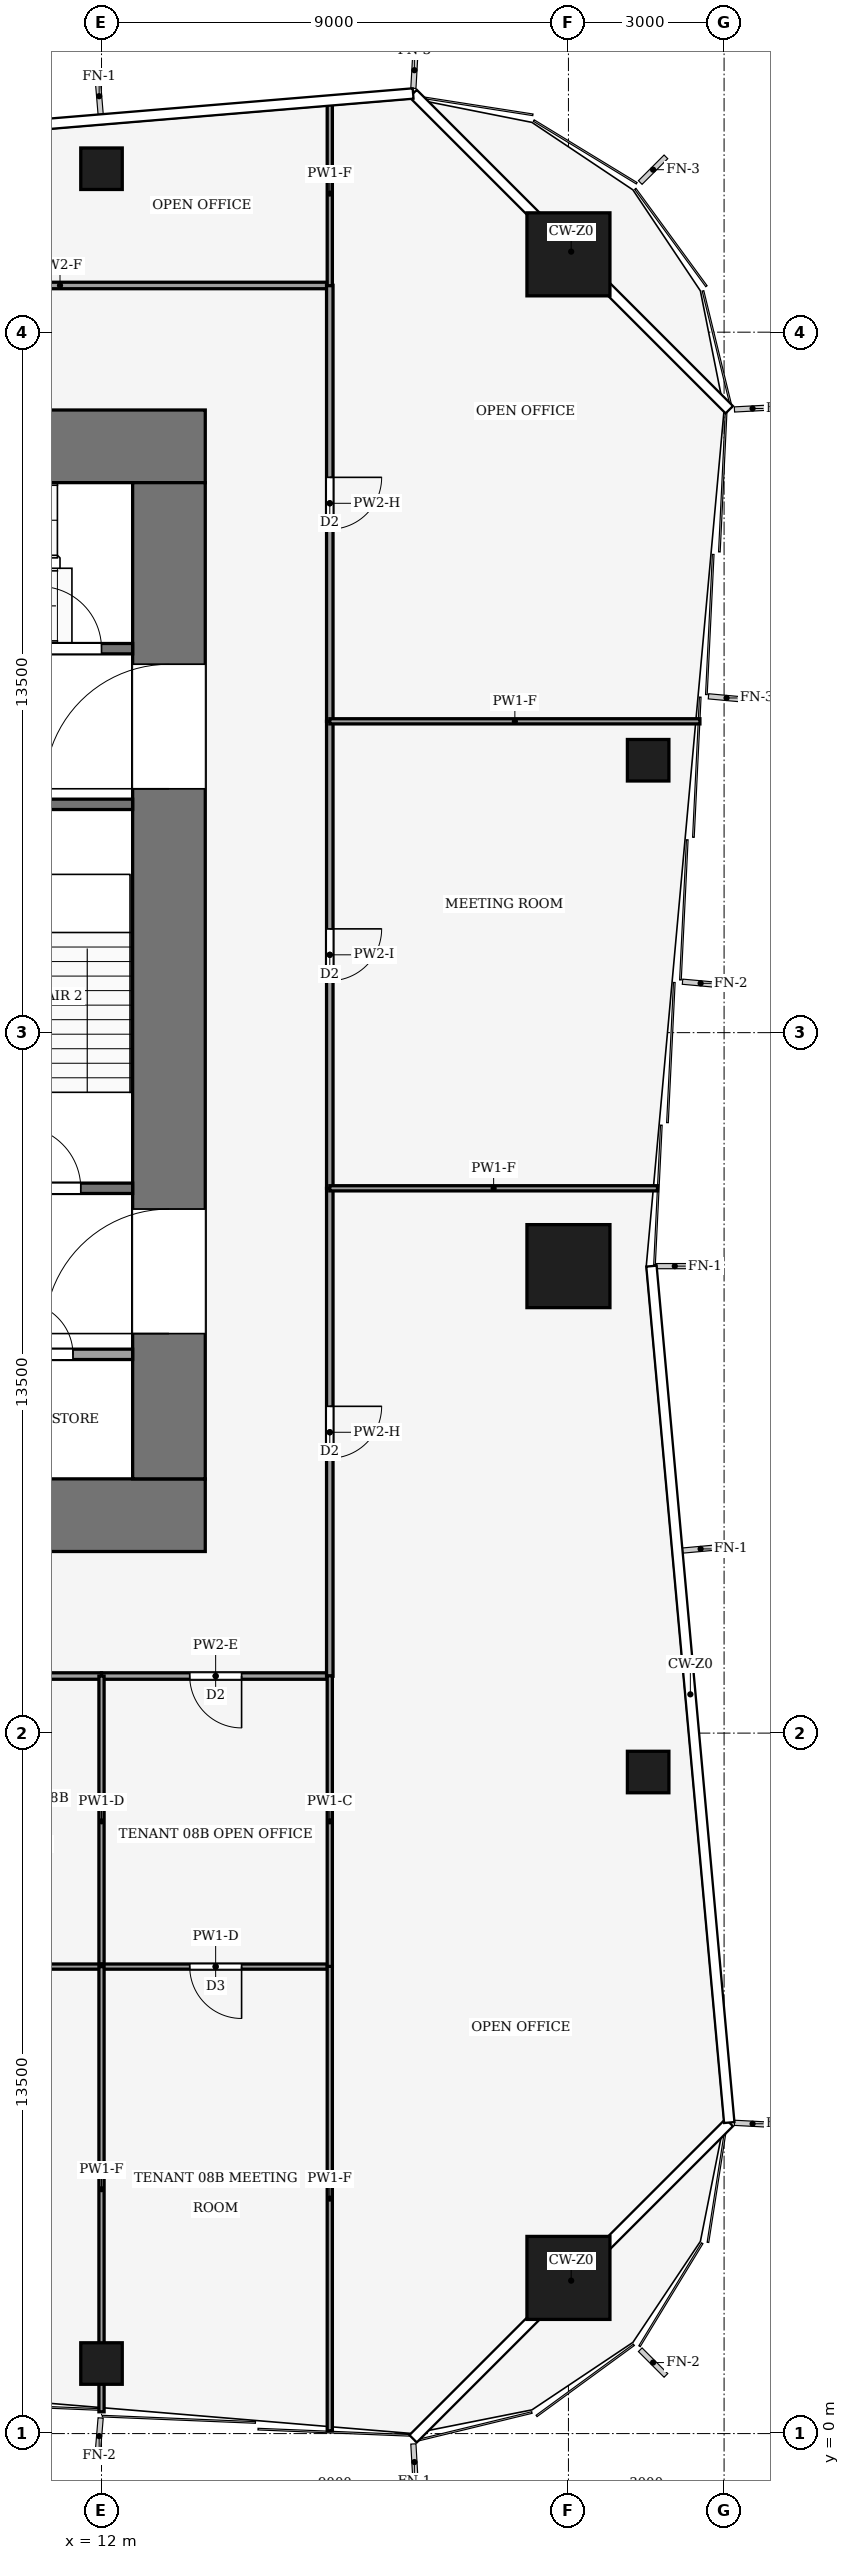
"""IFC4 building model, lengths in metres.
Left out: names, types, materials, properties, quantities, classifications, styles, units other than length and angle.
Written with IfcOpenShell. Run it as: python <this file> out.ifc"""

import sys

from ifc_helpers import new_model, si_unit, direction, frame, frame_2d, origin, origin_2d, place, context, subcontext, project, spatial, rectangle, hollow_rectangle, extrude, element, fill, save


model = new_model("IFC4")
c1 = context("Model", 3, precision=1e-05, world=origin(), true_north=direction((0.0, 1.0)))
c2 = subcontext(c1, "Body", "Model", "MODEL_VIEW")
j1 = project(units=[si_unit("LENGTHUNIT", "METRE"), si_unit("PLANEANGLEUNIT", "RADIAN")], contexts=[c1])
p1 = place(None, origin())
s1 = spatial("IfcSite", under=j1, at=p1, CompositionType="ELEMENT")
p2 = place(p1, origin())
s2 = spatial("IfcBuilding", under=s1, at=p2, CompositionType="ELEMENT")
p3 = place(p2, frame((0.0, 0.0, 38.0)))
s3 = spatial("IfcBuildingStorey", under=s2, at=p3, CompositionType="ELEMENT", Elevation=38.0)
for number, where, z_axis, x_axis in (
    (1, (-14.0, 17.7, -0.13), (0.0, 0.0, 1.0), (1.0, 0.0, 0.0)),
    (2, (-14.0, 38.3, -0.13), (0.0, 0.0, 1.0), (1.0, 0.0, 0.0)),
):
    element("IfcWall", number, at=place(p3, frame(where, z_axis=z_axis, x_axis=x_axis)), inside=s3, PredefinedType="SHEAR", context=c2, shape_type="SweptSolid", body=[
        extrude(rectangle(XDim=28.0, YDim=1.4, at=frame_2d((14.0, 0.0))), origin(), (0.0, 0.0, 1.0), 4.0),
    ])
p4 = place(p3, frame((13.3, 18.4, -0.13), z_axis=(0.0, 0.0, 1.0), x_axis=(0.0, 1.0, 0.0)))
e3 = element("IfcWall", 3, at=p4, inside=s3, PredefinedType="SHEAR", context=c2, shape_type="SweptSolid", body=[
    extrude(rectangle(XDim=19.2, YDim=1.4, at=frame_2d((9.6, 0.0))), origin(), (0.0, 0.0, 1.0), 4.0),
])
p5 = place(p4, frame((2.8, 0.0, 0.13)))
e4 = element("IfcOpeningElement", 4, at=p5, cuts=e3, PredefinedType="OPENING", context=c2, shape_type="SweptSolid", body=[
    extrude(rectangle(XDim=2.4, YDim=2.4, at=frame_2d((1.2, 1.2))), frame((0.0, 0.71, 0.0), z_axis=(0.0, -1.0, 0.0), x_axis=(1.0, 0.0, 0.0)), (0.0, 0.0, 1.0), 1.42),
])
p6 = place(p4, frame((13.3, 0.0, 0.13)))
e5 = element("IfcOpeningElement", 5, at=p6, cuts=e3, PredefinedType="OPENING", context=c2, shape_type="SweptSolid", body=[
    extrude(rectangle(XDim=2.4, YDim=2.4, at=frame_2d((1.2, 1.2))), frame((0.0, 0.71, 0.0), z_axis=(0.0, -1.0, 0.0), x_axis=(1.0, 0.0, 0.0)), (0.0, 0.0, 1.0), 1.42),
])
for number, where, z_axis, x_axis in (
    (6, (21.0, 42.0, 0.0), (0.0, 0.0, 1.0), (1.0, 0.0, 0.0)),
    (7, (21.0, 22.5, 0.0), (0.0, 0.0, 1.0), (1.0, 0.0, 0.0)),
    (8, (21.0, 3.0, 0.0), (0.0, 0.0, 1.0), (1.0, 0.0, 0.0)),
):
    element("IfcColumn", number, at=place(p3, frame(where, z_axis=z_axis, x_axis=x_axis)), inside=s3, PredefinedType="COLUMN", context=c2, shape_type="SweptSolid", body=[
        extrude(hollow_rectangle(XDim=1.6, YDim=1.6, WallThickness=0.09, at=origin_2d()), origin(), (0.0, 0.0, 1.0), 4.0),
    ])
for number, where, z_axis, x_axis in (
    (9, (12.0, 43.65, 0.0), (0.0, 0.0, 1.0), (1.0, 0.0, 0.0)),
    (10, (12.0, 1.35, 0.0), (0.0, 0.0, 1.0), (1.0, 0.0, 0.0)),
    (11, (22.536, 12.75, 0.0), (0.0, 0.0, 1.0), (1.0, 0.0, 0.0)),
    (12, (22.536, 32.25, 0.0), (0.0, 0.0, 1.0), (1.0, 0.0, 0.0)),
):
    element("IfcColumn", number, at=place(p3, frame(where, z_axis=z_axis, x_axis=x_axis)), inside=s3, PredefinedType="COLUMN", context=c2, shape_type="SweptSolid", body=[
        extrude(hollow_rectangle(XDim=0.8, YDim=0.8, WallThickness=0.04, at=origin_2d()), origin(), (0.0, 0.0, 1.0), 4.0),
    ])
p7 = place(p3, frame((6.0, 20.8, 0.0), z_axis=(0.0, 0.0, 1.0), x_axis=(1.0, 0.0, 0.0)))
e13 = element("IfcWall", 13, at=p7, inside=s3, PredefinedType="PARTITIONING", context=c2, shape_type="SweptSolid", body=[
    extrude(rectangle(XDim=6.6, YDim=0.2, at=frame_2d((3.3, 0.0))), origin(), (0.0, 0.0, 1.0), 3.87),
])
p8 = place(p7, frame((1.15, 0.0, 0.0)))
e14 = element("IfcOpeningElement", 14, at=p8, cuts=e13, PredefinedType="OPENING", context=c2, shape_type="SweptSolid", body=[
    extrude(rectangle(XDim=1.0, YDim=2.1, at=frame_2d((0.5, 1.05))), frame((0.0, 0.11, 0.0), z_axis=(0.0, -1.0, 0.0), x_axis=(1.0, 0.0, 0.0)), (0.0, 0.0, 1.0), 0.22),
])
p9 = place(p7, frame((4.45, 0.0, 0.0)))
e15 = element("IfcOpeningElement", 15, at=p9, cuts=e13, PredefinedType="OPENING", context=c2, shape_type="SweptSolid", body=[
    extrude(rectangle(XDim=1.0, YDim=2.1, at=frame_2d((0.5, 1.05))), frame((0.0, 0.11, 0.0), z_axis=(0.0, -1.0, 0.0), x_axis=(1.0, 0.0, 0.0)), (0.0, 0.0, 1.0), 0.22),
])
p10 = place(p3, frame((6.0, 24.0, 0.0), z_axis=(0.0, 0.0, 1.0), x_axis=(1.0, 0.0, 0.0)))
e16 = element("IfcWall", 16, at=p10, inside=s3, PredefinedType="PARTITIONING", context=c2, shape_type="SweptSolid", body=[
    extrude(rectangle(XDim=6.6, YDim=0.2, at=frame_2d((3.3, 0.0))), origin(), (0.0, 0.0, 1.0), 3.87),
])
p11 = place(p10, frame((0.9, 0.0, 0.0)))
e17 = element("IfcOpeningElement", 17, at=p11, cuts=e16, PredefinedType="OPENING", context=c2, shape_type="SweptSolid", body=[
    extrude(rectangle(XDim=1.0, YDim=2.1, at=frame_2d((0.5, 1.05))), frame((0.0, 0.11, 0.0), z_axis=(0.0, -1.0, 0.0), x_axis=(1.0, 0.0, 0.0)), (0.0, 0.0, 1.0), 0.22),
])
p12 = place(p10, frame((4.4, 0.0, 0.0)))
e18 = element("IfcOpeningElement", 18, at=p12, cuts=e16, PredefinedType="OPENING", context=c2, shape_type="SweptSolid", body=[
    extrude(rectangle(XDim=1.2, YDim=2.2, at=frame_2d((0.6, 1.1))), frame((0.0, 0.11, 0.0), z_axis=(0.0, -1.0, 0.0), x_axis=(1.0, 0.0, 0.0)), (0.0, 0.0, 1.0), 0.22),
])
p13 = place(p3, frame((6.0, 31.4, 0.0), z_axis=(0.0, 0.0, 1.0), x_axis=(1.0, 0.0, 0.0)))
e19 = element("IfcWall", 19, at=p13, inside=s3, PredefinedType="PARTITIONING", context=c2, shape_type="SweptSolid", body=[
    extrude(rectangle(XDim=6.6, YDim=0.2, at=frame_2d((3.3, 0.0))), origin(), (0.0, 0.0, 1.0), 3.87),
])
p14 = place(p3, frame((6.0, 34.4, 0.0), z_axis=(0.0, 0.0, 1.0), x_axis=(1.0, 0.0, 0.0)))
e20 = element("IfcWall", 20, at=p14, inside=s3, PredefinedType="PARTITIONING", context=c2, shape_type="SweptSolid", body=[
    extrude(rectangle(XDim=6.6, YDim=0.2, at=frame_2d((3.3, 0.0))), origin(), (0.0, 0.0, 1.0), 3.87),
])
p15 = place(p14, frame((4.8, 0.0, 0.0)))
e21 = element("IfcOpeningElement", 21, at=p15, cuts=e20, PredefinedType="OPENING", context=c2, shape_type="SweptSolid", body=[
    extrude(rectangle(XDim=1.2, YDim=2.2, at=frame_2d((0.6, 1.1))), frame((0.0, 0.11, 0.0), z_axis=(0.0, -1.0, 0.0), x_axis=(1.0, 0.0, 0.0)), (0.0, 0.0, 1.0), 0.22),
])
p16 = place(p3, frame((9.0, 14.6, 0.0), z_axis=(0.0, 0.0, 1.0), x_axis=(1.0, 0.0, 0.0)))
e22 = element("IfcWall", 22, at=p16, inside=s3, PredefinedType="PARTITIONING", context=c2, shape_type="SweptSolid", body=[
    extrude(rectangle(XDim=3.0, YDim=0.125, at=frame_2d((1.5, 0.0))), origin(), (0.0, 0.0, 1.0), 3.29),
])
p17 = place(p3, frame((16.4, 14.6, 0.0), z_axis=(0.0, 0.0, 1.0), x_axis=(-1.0, 0.0, 0.0)))
e23 = element("IfcWall", 23, at=p17, inside=s3, PredefinedType="PARTITIONING", context=c2, shape_type="SweptSolid", body=[
    extrude(rectangle(XDim=4.4, YDim=0.125, at=frame_2d((2.2, 0.0))), origin(), (0.0, 0.0, 1.0), 3.29),
])
p18 = place(p17, frame((1.7, 0.0, 0.0)))
e24 = element("IfcOpeningElement", 24, at=p18, cuts=e23, PredefinedType="OPENING", context=c2, shape_type="SweptSolid", body=[
    extrude(rectangle(XDim=1.0, YDim=2.1, at=frame_2d((0.5, 1.05))), frame((0.0, 0.073, 0.0), z_axis=(0.0, -1.0, 0.0), x_axis=(1.0, 0.0, 0.0)), (0.0, 0.0, 1.0), 0.145),
])
p19 = place(p3, frame((6.0, 41.4, 0.0), z_axis=(0.0, 0.0, 1.0), x_axis=(1.0, 0.0, 0.0)))
e25 = element("IfcWall", 25, at=p19, inside=s3, PredefinedType="PARTITIONING", context=c2, shape_type="SweptSolid", body=[
    extrude(rectangle(XDim=10.4, YDim=0.125, at=frame_2d((5.2, 0.0))), origin(), (0.0, 0.0, 1.0), 3.54),
])
p20 = place(p19, frame((1.9, 0.0, 0.0)))
e26 = element("IfcOpeningElement", 26, at=p20, cuts=e25, PredefinedType="OPENING", context=c2, shape_type="SweptSolid", body=[
    extrude(rectangle(XDim=1.0, YDim=2.1, at=frame_2d((0.5, 1.05))), frame((0.0, 0.073, 0.0), z_axis=(0.0, -1.0, 0.0), x_axis=(1.0, 0.0, 0.0)), (0.0, 0.0, 1.0), 0.145),
])
p21 = place(p3, frame((16.4, 24.0, 0.0), z_axis=(0.0, 0.0, 1.0), x_axis=(0.0, -1.0, 0.0)))
e27 = element("IfcWall", 27, at=p21, inside=s3, PredefinedType="PARTITIONING", context=c2, shape_type="SweptSolid", body=[
    extrude(rectangle(XDim=9.404, YDim=0.125, at=frame_2d((4.702, 0.0))), origin(), (0.0, 0.0, 1.0), 3.14),
])
p22 = place(p21, frame((4.202, 0.0, 0.0)))
e28 = element("IfcOpeningElement", 28, at=p22, cuts=e27, PredefinedType="OPENING", context=c2, shape_type="SweptSolid", body=[
    extrude(rectangle(XDim=1.0, YDim=2.1, at=frame_2d((0.5, 1.05))), frame((0.0, 0.073, 0.0), z_axis=(0.0, -1.0, 0.0), x_axis=(1.0, 0.0, 0.0)), (0.0, 0.0, 1.0), 0.145),
])
p23 = place(p3, frame((16.4, 33.0, 0.0), z_axis=(0.0, 0.0, 1.0), x_axis=(0.0, -1.0, 0.0)))
e29 = element("IfcWall", 29, at=p23, inside=s3, PredefinedType="PARTITIONING", context=c2, shape_type="SweptSolid", body=[
    extrude(rectangle(XDim=9.0, YDim=0.125, at=frame_2d((4.5, 0.0))), origin(), (0.0, 0.0, 1.0), 3.48),
])
p24 = place(p23, frame((4.0, 0.0, 0.0)))
e30 = element("IfcOpeningElement", 30, at=p24, cuts=e29, PredefinedType="OPENING", context=c2, shape_type="SweptSolid", body=[
    extrude(rectangle(XDim=1.0, YDim=2.1, at=frame_2d((0.5, 1.05))), frame((0.0, 0.073, 0.0), z_axis=(0.0, -1.0, 0.0), x_axis=(1.0, 0.0, 0.0)), (0.0, 0.0, 1.0), 0.145),
])
p25 = place(p3, frame((16.4, 41.404, 0.0), z_axis=(0.0, 0.0, 1.0), x_axis=(0.0, -1.0, 0.0)))
e31 = element("IfcWall", 31, at=p25, inside=s3, PredefinedType="PARTITIONING", context=c2, shape_type="SweptSolid", body=[
    extrude(rectangle(XDim=8.404, YDim=0.125, at=frame_2d((4.202, 0.0))), origin(), (0.0, 0.0, 1.0), 3.14),
])
p26 = place(p25, frame((3.702, 0.0, 0.0)))
e32 = element("IfcOpeningElement", 32, at=p26, cuts=e31, PredefinedType="OPENING", context=c2, shape_type="SweptSolid", body=[
    extrude(rectangle(XDim=1.0, YDim=2.1, at=frame_2d((0.5, 1.05))), frame((0.0, 0.073, 0.0), z_axis=(0.0, -1.0, 0.0), x_axis=(1.0, 0.0, 0.0)), (0.0, 0.0, 1.0), 0.145),
])
p27 = place(p3, frame((12.0, 9.0, 0.0), z_axis=(0.0, 0.0, 1.0), x_axis=(0.0, 1.0, 0.0)))
e33 = element("IfcWall", 33, at=p27, inside=s3, PredefinedType="PARTITIONING", context=c2, shape_type="SweptSolid", body=[
    extrude(rectangle(XDim=5.6, YDim=0.1, at=frame_2d((2.8, 0.0))), origin(), (0.0, 0.0, 1.0), 3.29),
])
p28 = place(p3, frame((8.996, 9.0, 0.0), z_axis=(0.0, 0.0, 1.0), x_axis=(1.0, 0.0, 0.0)))
e34 = element("IfcWall", 34, at=p28, inside=s3, PredefinedType="PARTITIONING", context=c2, shape_type="SweptSolid", body=[
    extrude(rectangle(XDim=3.004, YDim=0.1, at=frame_2d((1.502, 0.0))), origin(), (0.0, 0.0, 1.0), 3.87),
])
p29 = place(p3, frame((16.4, 9.0, 0.0), z_axis=(0.0, 0.0, 1.0), x_axis=(-1.0, 0.0, 0.0)))
e35 = element("IfcWall", 35, at=p29, inside=s3, PredefinedType="PARTITIONING", context=c2, shape_type="SweptSolid", body=[
    extrude(rectangle(XDim=4.4, YDim=0.1, at=frame_2d((2.2, 0.0))), origin(), (0.0, 0.0, 1.0), 3.29),
])
p30 = place(p29, frame((1.7, 0.0, 0.0)))
e36 = element("IfcOpeningElement", 36, at=p30, cuts=e35, PredefinedType="OPENING", context=c2, shape_type="SweptSolid", body=[
    extrude(rectangle(XDim=1.0, YDim=2.1, at=frame_2d((0.5, 1.05))), frame((0.0, 0.06, 0.0), z_axis=(0.0, -1.0, 0.0), x_axis=(1.0, 0.0, 0.0)), (0.0, 0.0, 1.0), 0.12),
])
p31 = place(p3, frame((16.4, 8.996, 0.0), z_axis=(0.0, 0.0, 1.0), x_axis=(0.0, 1.0, 0.0)))
e37 = element("IfcWall", 37, at=p31, inside=s3, PredefinedType="PARTITIONING", context=c2, shape_type="SweptSolid", body=[
    extrude(rectangle(XDim=5.608, YDim=0.1, at=frame_2d((2.804, 0.0))), origin(), (0.0, 0.0, 1.0), 3.87),
])
p32 = place(p3, frame((12.0, 0.42, 0.0), z_axis=(0.0, 0.0, 1.0), x_axis=(0.0, 1.0, 0.0)))
e38 = element("IfcWall", 38, at=p32, inside=s3, PredefinedType="PARTITIONING", context=c2, shape_type="SweptSolid", body=[
    extrude(rectangle(XDim=8.58, YDim=0.1, at=frame_2d((4.29, 0.0))), origin(), (0.0, 0.0, 1.0), 3.04),
])
p33 = place(p3, frame((16.4, 0.053, 0.0), z_axis=(0.0, 0.0, 1.0), x_axis=(0.0, 1.0, 0.0)))
e39 = element("IfcWall", 39, at=p33, inside=s3, PredefinedType="PARTITIONING", context=c2, shape_type="SweptSolid", body=[
    extrude(rectangle(XDim=8.951, YDim=0.1, at=frame_2d((4.475, 0.0))), origin(), (0.0, 0.0, 1.0), 3.04),
])
p34 = place(p3, frame((16.4, 41.396, 0.0), z_axis=(0.0, 0.0, 1.0), x_axis=(0.0, 1.0, 0.0)))
e40 = element("IfcWall", 40, at=p34, inside=s3, PredefinedType="PARTITIONING", context=c2, shape_type="SweptSolid", body=[
    extrude(rectangle(XDim=3.551, YDim=0.1, at=frame_2d((1.775, 0.0))), origin(), (0.0, 0.0, 1.0), 3.04),
])
p35 = place(p3, frame((22.716, 24.0, 0.0), z_axis=(0.0, 0.0, 1.0), x_axis=(-1.0, 0.0, 0.0)))
e41 = element("IfcWall", 41, at=p35, inside=s3, PredefinedType="PARTITIONING", context=c2, shape_type="SweptSolid", body=[
    extrude(rectangle(XDim=6.316, YDim=0.1, at=frame_2d((3.158, 0.0))), origin(), (0.0, 0.0, 1.0), 3.04),
])
p36 = place(p3, frame((23.534, 33.0, 0.0), z_axis=(0.0, 0.0, 1.0), x_axis=(-1.0, 0.0, 0.0)))
e42 = element("IfcWall", 42, at=p36, inside=s3, PredefinedType="PARTITIONING", context=c2, shape_type="SweptSolid", body=[
    extrude(rectangle(XDim=7.135, YDim=0.1, at=frame_2d((3.567, 0.0))), origin(), (0.0, 0.0, 1.0), 3.04),
])
p37 = place(p9, origin())
e43 = element("IfcDoor", 43, at=p37, inside=s3, OperationType="SINGLE_SWING_LEFT", PredefinedType="DOOR", context=c2, shape_type="SweptSolid", body=[
    extrude(rectangle(XDim=1.0, YDim=2.1, at=frame_2d((0.5, 1.05))), frame((0.0, 0.025, 0.0), z_axis=(0.0, -1.0, 0.0), x_axis=(1.0, 0.0, 0.0)), (0.0, 0.0, 1.0), 0.05),
])
fill(e15, e43)
p38 = place(p12, origin())
e44 = element("IfcDoor", 44, at=p38, inside=s3, OperationType="SINGLE_SWING_LEFT", PredefinedType="DOOR", context=c2, shape_type="SweptSolid", body=[
    extrude(rectangle(XDim=1.2, YDim=2.2, at=frame_2d((0.6, 1.1))), frame((0.0, 0.025, 0.0), z_axis=(0.0, -1.0, 0.0), x_axis=(1.0, 0.0, 0.0)), (0.0, 0.0, 1.0), 0.05),
])
fill(e18, e44)
p39 = place(p15, origin())
e45 = element("IfcDoor", 45, at=p39, inside=s3, OperationType="SINGLE_SWING_RIGHT", PredefinedType="DOOR", context=c2, shape_type="SweptSolid", body=[
    extrude(rectangle(XDim=1.2, YDim=2.2, at=frame_2d((0.6, 1.1))), frame((0.0, 0.025, 0.0), z_axis=(0.0, -1.0, 0.0), x_axis=(1.0, 0.0, 0.0)), (0.0, 0.0, 1.0), 0.05),
])
fill(e21, e45)
p40 = place(p5, origin())
e46 = element("IfcDoor", 46, at=p40, inside=s3, OperationType="DOUBLE_DOOR_SINGLE_SWING", PredefinedType="DOOR", context=c2, shape_type="SweptSolid", body=[
    extrude(rectangle(XDim=2.4, YDim=2.4, at=frame_2d((1.2, 1.2))), frame((0.0, 0.025, 0.0), z_axis=(0.0, -1.0, 0.0), x_axis=(1.0, 0.0, 0.0)), (0.0, 0.0, 1.0), 0.05),
])
fill(e4, e46)
p41 = place(p6, origin())
e47 = element("IfcDoor", 47, at=p41, inside=s3, OperationType="DOUBLE_DOOR_SINGLE_SWING", PredefinedType="DOOR", context=c2, shape_type="SweptSolid", body=[
    extrude(rectangle(XDim=2.4, YDim=2.4, at=frame_2d((1.2, 1.2))), frame((0.0, 0.025, 0.0), z_axis=(0.0, -1.0, 0.0), x_axis=(1.0, 0.0, 0.0)), (0.0, 0.0, 1.0), 0.05),
])
fill(e5, e47)
p42 = place(p18, origin())
e48 = element("IfcDoor", 48, at=p42, inside=s3, OperationType="SINGLE_SWING_RIGHT", PredefinedType="DOOR", context=c2, shape_type="SweptSolid", body=[
    extrude(rectangle(XDim=1.0, YDim=2.1, at=frame_2d((0.5, 1.05))), frame((0.0, 0.025, 0.0), z_axis=(0.0, -1.0, 0.0), x_axis=(1.0, 0.0, 0.0)), (0.0, 0.0, 1.0), 0.05),
])
fill(e24, e48)
p43 = place(p22, origin())
e49 = element("IfcDoor", 49, at=p43, inside=s3, OperationType="SINGLE_SWING_RIGHT", PredefinedType="DOOR", context=c2, shape_type="SweptSolid", body=[
    extrude(rectangle(XDim=1.0, YDim=2.1, at=frame_2d((0.5, 1.05))), frame((0.0, 0.025, 0.0), z_axis=(0.0, -1.0, 0.0), x_axis=(1.0, 0.0, 0.0)), (0.0, 0.0, 1.0), 0.05),
])
fill(e28, e49)
p44 = place(p24, origin())
e50 = element("IfcDoor", 50, at=p44, inside=s3, OperationType="SINGLE_SWING_LEFT", PredefinedType="DOOR", context=c2, shape_type="SweptSolid", body=[
    extrude(rectangle(XDim=1.0, YDim=2.1, at=frame_2d((0.5, 1.05))), frame((0.0, 0.025, 0.0), z_axis=(0.0, -1.0, 0.0), x_axis=(1.0, 0.0, 0.0)), (0.0, 0.0, 1.0), 0.05),
])
fill(e30, e50)
p45 = place(p26, origin())
e51 = element("IfcDoor", 51, at=p45, inside=s3, OperationType="SINGLE_SWING_RIGHT", PredefinedType="DOOR", context=c2, shape_type="SweptSolid", body=[
    extrude(rectangle(XDim=1.0, YDim=2.1, at=frame_2d((0.5, 1.05))), frame((0.0, 0.025, 0.0), z_axis=(0.0, -1.0, 0.0), x_axis=(1.0, 0.0, 0.0)), (0.0, 0.0, 1.0), 0.05),
])
fill(e32, e51)
p46 = place(p30, origin())
e52 = element("IfcDoor", 52, at=p46, inside=s3, OperationType="SINGLE_SWING_RIGHT", PredefinedType="DOOR", context=c2, shape_type="SweptSolid", body=[
    extrude(rectangle(XDim=1.0, YDim=2.1, at=frame_2d((0.5, 1.05))), frame((0.0, 0.025, 0.0), z_axis=(0.0, -1.0, 0.0), x_axis=(1.0, 0.0, 0.0)), (0.0, 0.0, 1.0), 0.05),
])
fill(e36, e52)
save(model, sys.argv[1])
